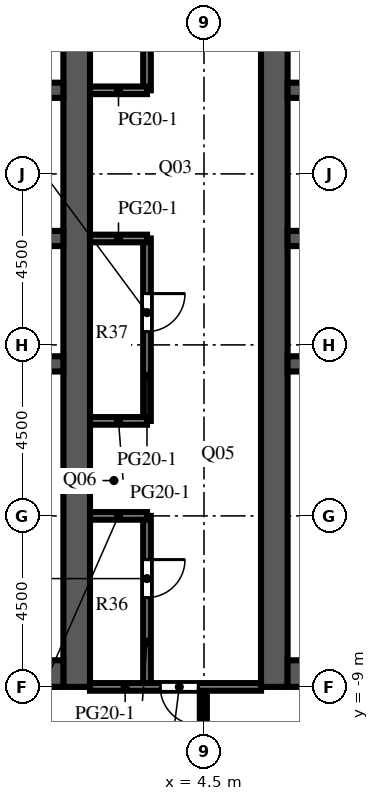
"""IFC4 building model, lengths in metres.
Left out: names, types, materials, properties, quantities, classifications, styles, units other than length and angle.
Written with IfcOpenShell. Run it as: python <this file> out.ifc"""

import sys

from ifc_helpers import new_model, si_unit, direction, frame, frame_2d, origin, place, context, subcontext, project, spatial, rectangle, extrude, element, fill, save


model = new_model("IFC4")
c1 = context("Model", 3, precision=1e-05, world=origin(), true_north=direction((0.0, 1.0)))
c2 = subcontext(c1, "Body", "Model", "MODEL_VIEW")
j1 = project(units=[si_unit("LENGTHUNIT", "METRE"), si_unit("PLANEANGLEUNIT", "RADIAN")], contexts=[c1])
p1 = place(None, origin())
s1 = spatial("IfcSite", under=j1, at=p1, CompositionType="ELEMENT")
p2 = place(p1, origin())
s2 = spatial("IfcBuilding", under=s1, at=p2, CompositionType="ELEMENT")
p3 = place(p2, frame((0.0, 0.0, 231.6)))
s3 = spatial("IfcBuildingStorey", under=s2, at=p3, CompositionType="ELEMENT", Elevation=231.6)
p4 = place(p3, frame((1.15, -9.0, 0.0), z_axis=(0.0, 0.0, 1.0), x_axis=(0.0, 1.0, 0.0)))
e1 = element("IfcWall", 1, at=p4, inside=s3, PredefinedType="SHEAR", context=c2, shape_type="SweptSolid", body=[
    extrude(rectangle(XDim=27.5, YDim=0.7, at=frame_2d((13.75, 0.0))), origin(), (0.0, 0.0, 1.0), 4.1),
])
p5 = place(p4, frame((12.55, 0.0, 0.0)))
e2 = element("IfcOpeningElement", 2, at=p5, cuts=e1, PredefinedType="OPENING", context=c2, shape_type="SweptSolid", body=[
    extrude(rectangle(XDim=2.4, YDim=2.4, at=frame_2d((1.2, 1.2))), frame((0.0, 0.36, 0.0), z_axis=(0.0, -1.0, 0.0), x_axis=(1.0, 0.0, 0.0)), (0.0, 0.0, 1.0), 0.72),
])
p6 = place(p4, frame((5.42, 0.0, 0.0)))
e3 = element("IfcOpeningElement", 3, at=p6, cuts=e1, PredefinedType="OPENING", context=c2, shape_type="SweptSolid", body=[
    extrude(rectangle(XDim=1.2, YDim=2.1, at=frame_2d((0.6, 1.05))), frame((0.0, 0.36, 0.0), z_axis=(0.0, -1.0, 0.0), x_axis=(1.0, 0.0, 0.0)), (0.0, 0.0, 1.0), 0.72),
])
p7 = place(p4, frame((19.46, 0.0, 0.0)))
e4 = element("IfcOpeningElement", 4, at=p7, cuts=e1, PredefinedType="OPENING", context=c2, shape_type="SweptSolid", body=[
    extrude(rectangle(XDim=1.0, YDim=2.1, at=frame_2d((0.5, 1.05))), frame((0.0, 0.36, 0.0), z_axis=(0.0, -1.0, 0.0), x_axis=(1.0, 0.0, 0.0)), (0.0, 0.0, 1.0), 0.72),
])
p8 = place(p4, frame((21.17, 0.0, 0.0)))
e5 = element("IfcOpeningElement", 5, at=p8, cuts=e1, PredefinedType="OPENING", context=c2, shape_type="SweptSolid", body=[
    extrude(rectangle(XDim=1.0, YDim=2.1, at=frame_2d((0.5, 1.05))), frame((0.0, 0.36, 0.0), z_axis=(0.0, -1.0, 0.0), x_axis=(1.0, 0.0, 0.0)), (0.0, 0.0, 1.0), 0.72),
])
p9 = place(p4, frame((23.26, 0.0, 0.0)))
e6 = element("IfcOpeningElement", 6, at=p9, cuts=e1, PredefinedType="OPENING", context=c2, shape_type="SweptSolid", body=[
    extrude(rectangle(XDim=1.0, YDim=2.1, at=frame_2d((0.5, 1.05))), frame((0.0, 0.36, 0.0), z_axis=(0.0, -1.0, 0.0), x_axis=(1.0, 0.0, 0.0)), (0.0, 0.0, 1.0), 0.72),
])
p10 = place(p4, frame((25.35, 0.0, 0.0)))
e7 = element("IfcOpeningElement", 7, at=p10, cuts=e1, PredefinedType="OPENING", context=c2, shape_type="SweptSolid", body=[
    extrude(rectangle(XDim=1.0, YDim=2.1, at=frame_2d((0.5, 1.05))), frame((0.0, 0.36, 0.0), z_axis=(0.0, -1.0, 0.0), x_axis=(1.0, 0.0, 0.0)), (0.0, 0.0, 1.0), 0.72),
])
p11 = place(p3, frame((-9.8, -8.65, 0.0), z_axis=(0.0, 0.0, 1.0), x_axis=(1.0, 0.0, 0.0)))
e8 = element("IfcWall", 8, at=p11, inside=s3, PredefinedType="SHEAR", context=c2, shape_type="SweptSolid", body=[
    extrude(rectangle(XDim=10.6, YDim=0.7, at=frame_2d((5.3, 0.0))), origin(), (0.0, 0.0, 1.0), 4.1),
])
p12 = place(p3, frame((-9.8, -0.5, 0.0), z_axis=(0.0, 0.0, 1.0), x_axis=(1.0, 0.0, 0.0)))
e9 = element("IfcWall", 9, at=p12, inside=s3, PredefinedType="SHEAR", context=c2, shape_type="SweptSolid", body=[
    extrude(rectangle(XDim=10.6, YDim=0.4, at=frame_2d((5.3, 0.0))), origin(), (0.0, 0.0, 1.0), 4.1),
])
p13 = place(p3, frame((-9.8, 2.8, 0.0), z_axis=(0.0, 0.0, 1.0), x_axis=(1.0, 0.0, 0.0)))
e10 = element("IfcWall", 10, at=p13, inside=s3, PredefinedType="SHEAR", context=c2, shape_type="SweptSolid", body=[
    extrude(rectangle(XDim=10.6, YDim=0.4, at=frame_2d((5.3, 0.0))), origin(), (0.0, 0.0, 1.0), 4.1),
])
p14 = place(p13, frame((0.688, 0.0, 0.0)))
e11 = element("IfcOpeningElement", 11, at=p14, cuts=e10, PredefinedType="OPENING", context=c2, shape_type="SweptSolid", body=[
    extrude(rectangle(XDim=1.1, YDim=2.1, at=frame_2d((0.55, 1.05))), frame((0.0, 0.21, 0.0), z_axis=(0.0, -1.0, 0.0), x_axis=(1.0, 0.0, 0.0)), (0.0, 0.0, 1.0), 0.42),
])
p15 = place(p13, frame((3.438, 0.0, 0.0)))
e12 = element("IfcOpeningElement", 12, at=p15, cuts=e10, PredefinedType="OPENING", context=c2, shape_type="SweptSolid", body=[
    extrude(rectangle(XDim=1.1, YDim=2.1, at=frame_2d((0.55, 1.05))), frame((0.0, 0.21, 0.0), z_axis=(0.0, -1.0, 0.0), x_axis=(1.0, 0.0, 0.0)), (0.0, 0.0, 1.0), 0.42),
])
p16 = place(p13, frame((6.113, 0.0, 0.0)))
e13 = element("IfcOpeningElement", 13, at=p16, cuts=e10, PredefinedType="OPENING", context=c2, shape_type="SweptSolid", body=[
    extrude(rectangle(XDim=1.0, YDim=2.1, at=frame_2d((0.5, 1.05))), frame((0.0, 0.21, 0.0), z_axis=(0.0, -1.0, 0.0), x_axis=(1.0, 0.0, 0.0)), (0.0, 0.0, 1.0), 0.42),
])
p17 = place(p13, frame((8.863, 0.0, 0.0)))
e14 = element("IfcOpeningElement", 14, at=p17, cuts=e10, PredefinedType="OPENING", context=c2, shape_type="SweptSolid", body=[
    extrude(rectangle(XDim=1.0, YDim=2.1, at=frame_2d((0.5, 1.05))), frame((0.0, 0.21, 0.0), z_axis=(0.0, -1.0, 0.0), x_axis=(1.0, 0.0, 0.0)), (0.0, 0.0, 1.0), 0.42),
])
p18 = place(p3, frame((-9.8, 6.7, 0.0), z_axis=(0.0, 0.0, 1.0), x_axis=(1.0, 0.0, 0.0)))
e15 = element("IfcWall", 15, at=p18, inside=s3, PredefinedType="SHEAR", context=c2, shape_type="SweptSolid", body=[
    extrude(rectangle(XDim=10.6, YDim=0.4, at=frame_2d((5.3, 0.0))), origin(), (0.0, 0.0, 1.0), 4.1),
])
p19 = place(p18, frame((3.438, 0.0, 0.0)))
e16 = element("IfcOpeningElement", 16, at=p19, cuts=e15, PredefinedType="OPENING", context=c2, shape_type="SweptSolid", body=[
    extrude(rectangle(XDim=1.1, YDim=2.1, at=frame_2d((0.55, 1.05))), frame((0.0, 0.21, 0.0), z_axis=(0.0, -1.0, 0.0), x_axis=(1.0, 0.0, 0.0)), (0.0, 0.0, 1.0), 0.42),
])
p20 = place(p18, frame((6.062, 0.0, 0.0)))
e17 = element("IfcOpeningElement", 17, at=p20, cuts=e15, PredefinedType="OPENING", context=c2, shape_type="SweptSolid", body=[
    extrude(rectangle(XDim=1.1, YDim=2.1, at=frame_2d((0.55, 1.05))), frame((0.0, 0.21, 0.0), z_axis=(0.0, -1.0, 0.0), x_axis=(1.0, 0.0, 0.0)), (0.0, 0.0, 1.0), 0.42),
])
p21 = place(p18, frame((8.812, 0.0, 0.0)))
e18 = element("IfcOpeningElement", 18, at=p21, cuts=e15, PredefinedType="OPENING", context=c2, shape_type="SweptSolid", body=[
    extrude(rectangle(XDim=1.1, YDim=2.1, at=frame_2d((0.55, 1.05))), frame((0.0, 0.21, 0.0), z_axis=(0.0, -1.0, 0.0), x_axis=(1.0, 0.0, 0.0)), (0.0, 0.0, 1.0), 0.42),
])
p22 = place(p18, frame((0.738, 0.0, 0.0)))
e19 = element("IfcOpeningElement", 19, at=p22, cuts=e15, PredefinedType="OPENING", context=c2, shape_type="SweptSolid", body=[
    extrude(rectangle(XDim=1.0, YDim=2.1, at=frame_2d((0.5, 1.05))), frame((0.0, 0.21, 0.0), z_axis=(0.0, -1.0, 0.0), x_axis=(1.0, 0.0, 0.0)), (0.0, 0.0, 1.0), 0.42),
])
p23 = place(p3, frame((6.35, -9.0, 0.0), z_axis=(0.0, 0.0, 1.0), x_axis=(0.0, 1.0, 0.0)))
e20 = element("IfcWall", 20, at=p23, inside=s3, PredefinedType="SHEAR", context=c2, shape_type="SweptSolid", body=[
    extrude(rectangle(XDim=27.5, YDim=0.7, at=frame_2d((13.75, 0.0))), origin(), (0.0, 0.0, 1.0), 4.1),
])
p24 = place(p23, frame((12.55, 0.0, 0.0)))
e21 = element("IfcOpeningElement", 21, at=p24, cuts=e20, PredefinedType="OPENING", context=c2, shape_type="SweptSolid", body=[
    extrude(rectangle(XDim=2.4, YDim=2.4, at=frame_2d((1.2, 1.2))), frame((0.0, 0.36, 0.0), z_axis=(0.0, -1.0, 0.0), x_axis=(1.0, 0.0, 0.0)), (0.0, 0.0, 1.0), 0.72),
])
p25 = place(p23, frame((5.42, 0.0, 0.0)))
e22 = element("IfcOpeningElement", 22, at=p25, cuts=e20, PredefinedType="OPENING", context=c2, shape_type="SweptSolid", body=[
    extrude(rectangle(XDim=1.2, YDim=2.1, at=frame_2d((0.6, 1.05))), frame((0.0, 0.36, 0.0), z_axis=(0.0, -1.0, 0.0), x_axis=(1.0, 0.0, 0.0)), (0.0, 0.0, 1.0), 0.72),
])
p26 = place(p23, frame((19.46, 0.0, 0.0)))
e23 = element("IfcOpeningElement", 23, at=p26, cuts=e20, PredefinedType="OPENING", context=c2, shape_type="SweptSolid", body=[
    extrude(rectangle(XDim=1.0, YDim=2.1, at=frame_2d((0.5, 1.05))), frame((0.0, 0.36, 0.0), z_axis=(0.0, -1.0, 0.0), x_axis=(1.0, 0.0, 0.0)), (0.0, 0.0, 1.0), 0.72),
])
p27 = place(p23, frame((21.17, 0.0, 0.0)))
e24 = element("IfcOpeningElement", 24, at=p27, cuts=e20, PredefinedType="OPENING", context=c2, shape_type="SweptSolid", body=[
    extrude(rectangle(XDim=1.0, YDim=2.1, at=frame_2d((0.5, 1.05))), frame((0.0, 0.36, 0.0), z_axis=(0.0, -1.0, 0.0), x_axis=(1.0, 0.0, 0.0)), (0.0, 0.0, 1.0), 0.72),
])
p28 = place(p23, frame((23.26, 0.0, 0.0)))
e25 = element("IfcOpeningElement", 25, at=p28, cuts=e20, PredefinedType="OPENING", context=c2, shape_type="SweptSolid", body=[
    extrude(rectangle(XDim=1.0, YDim=2.1, at=frame_2d((0.5, 1.05))), frame((0.0, 0.36, 0.0), z_axis=(0.0, -1.0, 0.0), x_axis=(1.0, 0.0, 0.0)), (0.0, 0.0, 1.0), 0.72),
])
p29 = place(p23, frame((25.35, 0.0, 0.0)))
e26 = element("IfcOpeningElement", 26, at=p29, cuts=e20, PredefinedType="OPENING", context=c2, shape_type="SweptSolid", body=[
    extrude(rectangle(XDim=1.0, YDim=2.1, at=frame_2d((0.5, 1.05))), frame((0.0, 0.36, 0.0), z_axis=(0.0, -1.0, 0.0), x_axis=(1.0, 0.0, 0.0)), (0.0, 0.0, 1.0), 0.72),
])
p30 = place(p3, frame((6.7, -8.65, 0.0), z_axis=(0.0, 0.0, 1.0), x_axis=(1.0, 0.0, 0.0)))
e27 = element("IfcWall", 27, at=p30, inside=s3, PredefinedType="SHEAR", context=c2, shape_type="SweptSolid", body=[
    extrude(rectangle(XDim=10.6, YDim=0.7, at=frame_2d((5.3, 0.0))), origin(), (0.0, 0.0, 1.0), 4.1),
])
p31 = place(p3, frame((6.7, -0.5, 0.0), z_axis=(0.0, 0.0, 1.0), x_axis=(1.0, 0.0, 0.0)))
e28 = element("IfcWall", 28, at=p31, inside=s3, PredefinedType="SHEAR", context=c2, shape_type="SweptSolid", body=[
    extrude(rectangle(XDim=10.6, YDim=0.4, at=frame_2d((5.3, 0.0))), origin(), (0.0, 0.0, 1.0), 4.1),
])
p32 = place(p3, frame((6.7, 2.8, 0.0), z_axis=(0.0, 0.0, 1.0), x_axis=(1.0, 0.0, 0.0)))
e29 = element("IfcWall", 29, at=p32, inside=s3, PredefinedType="SHEAR", context=c2, shape_type="SweptSolid", body=[
    extrude(rectangle(XDim=10.6, YDim=0.4, at=frame_2d((5.3, 0.0))), origin(), (0.0, 0.0, 1.0), 4.1),
])
p33 = place(p32, frame((0.688, 0.0, 0.0)))
e30 = element("IfcOpeningElement", 30, at=p33, cuts=e29, PredefinedType="OPENING", context=c2, shape_type="SweptSolid", body=[
    extrude(rectangle(XDim=1.1, YDim=2.1, at=frame_2d((0.55, 1.05))), frame((0.0, 0.21, 0.0), z_axis=(0.0, -1.0, 0.0), x_axis=(1.0, 0.0, 0.0)), (0.0, 0.0, 1.0), 0.42),
])
p34 = place(p32, frame((3.438, 0.0, 0.0)))
e31 = element("IfcOpeningElement", 31, at=p34, cuts=e29, PredefinedType="OPENING", context=c2, shape_type="SweptSolid", body=[
    extrude(rectangle(XDim=1.1, YDim=2.1, at=frame_2d((0.55, 1.05))), frame((0.0, 0.21, 0.0), z_axis=(0.0, -1.0, 0.0), x_axis=(1.0, 0.0, 0.0)), (0.0, 0.0, 1.0), 0.42),
])
p35 = place(p32, frame((6.113, 0.0, 0.0)))
e32 = element("IfcOpeningElement", 32, at=p35, cuts=e29, PredefinedType="OPENING", context=c2, shape_type="SweptSolid", body=[
    extrude(rectangle(XDim=1.0, YDim=2.1, at=frame_2d((0.5, 1.05))), frame((0.0, 0.21, 0.0), z_axis=(0.0, -1.0, 0.0), x_axis=(1.0, 0.0, 0.0)), (0.0, 0.0, 1.0), 0.42),
])
p36 = place(p32, frame((8.863, 0.0, 0.0)))
e33 = element("IfcOpeningElement", 33, at=p36, cuts=e29, PredefinedType="OPENING", context=c2, shape_type="SweptSolid", body=[
    extrude(rectangle(XDim=1.0, YDim=2.1, at=frame_2d((0.5, 1.05))), frame((0.0, 0.21, 0.0), z_axis=(0.0, -1.0, 0.0), x_axis=(1.0, 0.0, 0.0)), (0.0, 0.0, 1.0), 0.42),
])
p37 = place(p3, frame((6.7, 6.7, 0.0), z_axis=(0.0, 0.0, 1.0), x_axis=(1.0, 0.0, 0.0)))
e34 = element("IfcWall", 34, at=p37, inside=s3, PredefinedType="SHEAR", context=c2, shape_type="SweptSolid", body=[
    extrude(rectangle(XDim=10.6, YDim=0.4, at=frame_2d((5.3, 0.0))), origin(), (0.0, 0.0, 1.0), 4.1),
])
p38 = place(p37, frame((3.438, 0.0, 0.0)))
e35 = element("IfcOpeningElement", 35, at=p38, cuts=e34, PredefinedType="OPENING", context=c2, shape_type="SweptSolid", body=[
    extrude(rectangle(XDim=1.1, YDim=2.1, at=frame_2d((0.55, 1.05))), frame((0.0, 0.21, 0.0), z_axis=(0.0, -1.0, 0.0), x_axis=(1.0, 0.0, 0.0)), (0.0, 0.0, 1.0), 0.42),
])
p39 = place(p37, frame((6.062, 0.0, 0.0)))
e36 = element("IfcOpeningElement", 36, at=p39, cuts=e34, PredefinedType="OPENING", context=c2, shape_type="SweptSolid", body=[
    extrude(rectangle(XDim=1.1, YDim=2.1, at=frame_2d((0.55, 1.05))), frame((0.0, 0.21, 0.0), z_axis=(0.0, -1.0, 0.0), x_axis=(1.0, 0.0, 0.0)), (0.0, 0.0, 1.0), 0.42),
])
p40 = place(p37, frame((8.812, 0.0, 0.0)))
e37 = element("IfcOpeningElement", 37, at=p40, cuts=e34, PredefinedType="OPENING", context=c2, shape_type="SweptSolid", body=[
    extrude(rectangle(XDim=1.1, YDim=2.1, at=frame_2d((0.55, 1.05))), frame((0.0, 0.21, 0.0), z_axis=(0.0, -1.0, 0.0), x_axis=(1.0, 0.0, 0.0)), (0.0, 0.0, 1.0), 0.42),
])
p41 = place(p37, frame((0.738, 0.0, 0.0)))
e38 = element("IfcOpeningElement", 38, at=p41, cuts=e34, PredefinedType="OPENING", context=c2, shape_type="SweptSolid", body=[
    extrude(rectangle(XDim=1.0, YDim=2.1, at=frame_2d((0.5, 1.05))), frame((0.0, 0.21, 0.0), z_axis=(0.0, -1.0, 0.0), x_axis=(1.0, 0.0, 0.0)), (0.0, 0.0, 1.0), 0.42),
])
p42 = place(p3, frame((-0.7, -5.26, 0.0), z_axis=(0.0, 0.0, 1.0), x_axis=(1.0, 0.0, 0.0)))
e39 = element("IfcWall", 39, at=p42, inside=s3, PredefinedType="PARTITIONING", context=c2, shape_type="SweptSolid", body=[
    extrude(rectangle(XDim=1.5, YDim=0.1, at=frame_2d((0.75, 0.0))), origin(), (0.0, 0.0, 1.0), 3.65),
])
p43 = place(p42, frame((0.25, 0.0, 0.0)))
e40 = element("IfcOpeningElement", 40, at=p43, cuts=e39, PredefinedType="OPENING", context=c2, shape_type="SweptSolid", body=[
    extrude(rectangle(XDim=1.0, YDim=2.1, at=frame_2d((0.5, 1.05))), frame((0.0, 0.06, 0.0), z_axis=(0.0, -1.0, 0.0), x_axis=(1.0, 0.0, 0.0)), (0.0, 0.0, 1.0), 0.12),
])
p44 = place(p3, frame((6.7, -5.26, 0.0), z_axis=(0.0, 0.0, 1.0), x_axis=(1.0, 0.0, 0.0)))
e41 = element("IfcWall", 41, at=p44, inside=s3, PredefinedType="PARTITIONING", context=c2, shape_type="SweptSolid", body=[
    extrude(rectangle(XDim=1.5, YDim=0.1, at=frame_2d((0.75, 0.0))), origin(), (0.0, 0.0, 1.0), 3.65),
])
p45 = place(p44, frame((0.25, 0.0, 0.0)))
e42 = element("IfcOpeningElement", 42, at=p45, cuts=e41, PredefinedType="OPENING", context=c2, shape_type="SweptSolid", body=[
    extrude(rectangle(XDim=1.0, YDim=2.1, at=frame_2d((0.5, 1.05))), frame((0.0, 0.06, 0.0), z_axis=(0.0, -1.0, 0.0), x_axis=(1.0, 0.0, 0.0)), (0.0, 0.0, 1.0), 0.12),
])
p46 = place(p3, frame((3.0, -9.0, 0.0), z_axis=(0.0, 0.0, 1.0), x_axis=(0.0, 1.0, 0.0)))
e43 = element("IfcWall", 43, at=p46, inside=s3, PredefinedType="PARTITIONING", context=c2, shape_type="SweptSolid", body=[
    extrude(rectangle(XDim=4.5, YDim=0.2, at=frame_2d((2.25, 0.0))), origin(), (0.0, 0.0, 1.0), 3.65),
])
p47 = place(p46, frame((2.35, 0.0, 0.0)))
e44 = element("IfcOpeningElement", 44, at=p47, cuts=e43, PredefinedType="OPENING", context=c2, shape_type="SweptSolid", body=[
    extrude(rectangle(XDim=1.0, YDim=2.1, at=frame_2d((0.5, 1.05))), frame((0.0, 0.11, 0.0), z_axis=(0.0, -1.0, 0.0), x_axis=(1.0, 0.0, 0.0)), (0.0, 0.0, 1.0), 0.22),
])
p48 = place(p3, frame((3.0, -2.0, 0.0), z_axis=(0.0, 0.0, 1.0), x_axis=(0.0, 1.0, 0.0)))
e45 = element("IfcWall", 45, at=p48, inside=s3, PredefinedType="PARTITIONING", context=c2, shape_type="SweptSolid", body=[
    extrude(rectangle(XDim=4.8, YDim=0.2, at=frame_2d((2.4, 0.0))), origin(), (0.0, 0.0, 1.0), 3.65),
])
p49 = place(p48, frame((2.35, 0.0, 0.0)))
e46 = element("IfcOpeningElement", 46, at=p49, cuts=e45, PredefinedType="OPENING", context=c2, shape_type="SweptSolid", body=[
    extrude(rectangle(XDim=1.0, YDim=2.1, at=frame_2d((0.5, 1.05))), frame((0.0, 0.11, 0.0), z_axis=(0.0, -1.0, 0.0), x_axis=(1.0, 0.0, 0.0)), (0.0, 0.0, 1.0), 0.22),
])
p50 = place(p3, frame((3.0, 6.7, 0.0), z_axis=(0.0, 0.0, 1.0), x_axis=(0.0, 1.0, 0.0)))
e47 = element("IfcWall", 47, at=p50, inside=s3, PredefinedType="PARTITIONING", context=c2, shape_type="SweptSolid", body=[
    extrude(rectangle(XDim=11.8, YDim=0.2, at=frame_2d((5.9, 0.0))), origin(), (0.0, 0.0, 1.0), 3.65),
])
p51 = place(p50, frame((3.6, 0.0, 0.0)))
e48 = element("IfcOpeningElement", 48, at=p51, cuts=e47, PredefinedType="OPENING", context=c2, shape_type="SweptSolid", body=[
    extrude(rectangle(XDim=1.0, YDim=2.1, at=frame_2d((0.5, 1.05))), frame((0.0, 0.11, 0.0), z_axis=(0.0, -1.0, 0.0), x_axis=(1.0, 0.0, 0.0)), (0.0, 0.0, 1.0), 0.22),
])
p52 = place(p3, frame((4.5, -9.0, 0.0), z_axis=(0.0, 0.0, 1.0), x_axis=(0.0, -1.0, 0.0)))
e49 = element("IfcWall", 49, at=p52, inside=s3, PredefinedType="PARTITIONING", context=c2, shape_type="SweptSolid", body=[
    extrude(rectangle(XDim=13.1, YDim=0.15, at=frame_2d((6.55, 0.0))), origin(), (0.0, 0.0, 1.0), 3.65),
])
p53 = place(p52, frame((9.15, 0.0, 0.0)))
e50 = element("IfcOpeningElement", 50, at=p53, cuts=e49, PredefinedType="OPENING", context=c2, shape_type="SweptSolid", body=[
    extrude(rectangle(XDim=1.0, YDim=2.1, at=frame_2d((0.5, 1.05))), frame((0.0, 0.085, 0.0), z_axis=(0.0, -1.0, 0.0), x_axis=(1.0, 0.0, 0.0)), (0.0, 0.0, 1.0), 0.17),
])
p54 = place(p3, frame((6.0, -9.0, 0.0), z_axis=(0.0, 0.0, 1.0), x_axis=(-1.0, 0.0, 0.0)))
e51 = element("IfcWall", 51, at=p54, inside=s3, PredefinedType="PARTITIONING", context=c2, shape_type="SweptSolid", body=[
    extrude(rectangle(XDim=4.5, YDim=0.2, at=frame_2d((2.25, 0.0))), origin(), (0.0, 0.0, 1.0), 3.65),
])
p55 = place(p54, frame((1.65, 0.0, 0.0)))
e52 = element("IfcOpeningElement", 52, at=p55, cuts=e51, PredefinedType="OPENING", context=c2, shape_type="SweptSolid", body=[
    extrude(rectangle(XDim=1.0, YDim=2.1, at=frame_2d((0.5, 1.05))), frame((0.0, 0.11, 0.0), z_axis=(0.0, -1.0, 0.0), x_axis=(1.0, 0.0, 0.0)), (0.0, 0.0, 1.0), 0.22),
])
for number, where, z_axis, x_axis in (
    (53, (1.5, -4.5, 0.0), (0.0, 0.0, 1.0), (1.0, 0.0, 0.0)),
    (54, (1.5, -2.0, 0.0), (0.0, 0.0, 1.0), (1.0, 0.0, 0.0)),
    (55, (1.5, 2.8, 0.0), (0.0, 0.0, 1.0), (1.0, 0.0, 0.0)),
    (56, (1.5, 6.7, 0.0), (0.0, 0.0, 1.0), (1.0, 0.0, 0.0)),
):
    element("IfcWall", number, at=place(p3, frame(where, z_axis=z_axis, x_axis=x_axis)), inside=s3, PredefinedType="PARTITIONING", context=c2, shape_type="SweptSolid", body=[
        extrude(rectangle(XDim=1.5, YDim=0.2, at=frame_2d((0.75, 0.0))), origin(), (0.0, 0.0, 1.0), 3.65),
    ])
p56 = place(p5, origin())
e57 = element("IfcDoor", 57, at=p56, inside=s3, OperationType="DOUBLE_DOOR_DOUBLE_SWING", PredefinedType="DOOR", context=c2, shape_type="SweptSolid", body=[
    extrude(rectangle(XDim=2.4, YDim=2.4, at=frame_2d((1.2, 1.2))), frame((0.0, 0.025, 0.0), z_axis=(0.0, -1.0, 0.0), x_axis=(1.0, 0.0, 0.0)), (0.0, 0.0, 1.0), 0.05),
])
fill(e2, e57)
p57 = place(p24, origin())
e58 = element("IfcDoor", 58, at=p57, inside=s3, OperationType="DOUBLE_DOOR_DOUBLE_SWING", PredefinedType="DOOR", context=c2, shape_type="SweptSolid", body=[
    extrude(rectangle(XDim=2.4, YDim=2.4, at=frame_2d((1.2, 1.2))), frame((0.0, 0.025, 0.0), z_axis=(0.0, -1.0, 0.0), x_axis=(1.0, 0.0, 0.0)), (0.0, 0.0, 1.0), 0.05),
])
fill(e21, e58)
p58 = place(p6, origin())
e59 = element("IfcDoor", 59, at=p58, inside=s3, OperationType="SINGLE_SWING_LEFT", PredefinedType="DOOR", context=c2, shape_type="SweptSolid", body=[
    extrude(rectangle(XDim=1.2, YDim=2.1, at=frame_2d((0.6, 1.05))), frame((0.0, 0.325, 0.0), z_axis=(0.0, -1.0, 0.0), x_axis=(1.0, 0.0, 0.0)), (0.0, 0.0, 1.0), 0.05),
])
fill(e3, e59)
p59 = place(p43, origin())
e60 = element("IfcDoor", 60, at=p59, inside=s3, OperationType="SINGLE_SWING_RIGHT", PredefinedType="DOOR", context=c2, shape_type="SweptSolid", body=[
    extrude(rectangle(XDim=1.0, YDim=2.1, at=frame_2d((0.5, 1.05))), frame((0.0, 0.025, 0.0), z_axis=(0.0, -1.0, 0.0), x_axis=(1.0, 0.0, 0.0)), (0.0, 0.0, 1.0), 0.05),
])
fill(e40, e60)
p60 = place(p25, origin())
e61 = element("IfcDoor", 61, at=p60, inside=s3, OperationType="SINGLE_SWING_RIGHT", PredefinedType="DOOR", context=c2, shape_type="SweptSolid", body=[
    extrude(rectangle(XDim=1.2, YDim=2.1, at=frame_2d((0.6, 1.05))), frame((0.0, -0.275, 0.0), z_axis=(0.0, -1.0, 0.0), x_axis=(1.0, 0.0, 0.0)), (0.0, 0.0, 1.0), 0.05),
])
fill(e22, e61)
p61 = place(p45, origin())
e62 = element("IfcDoor", 62, at=p61, inside=s3, OperationType="SINGLE_SWING_LEFT", PredefinedType="DOOR", context=c2, shape_type="SweptSolid", body=[
    extrude(rectangle(XDim=1.0, YDim=2.1, at=frame_2d((0.5, 1.05))), frame((0.0, 0.025, 0.0), z_axis=(0.0, -1.0, 0.0), x_axis=(1.0, 0.0, 0.0)), (0.0, 0.0, 1.0), 0.05),
])
fill(e42, e62)
p62 = place(p55, origin())
e63 = element("IfcDoor", 63, at=p62, inside=s3, OperationType="SINGLE_SWING_LEFT", PredefinedType="DOOR", context=c2, shape_type="SweptSolid", body=[
    extrude(rectangle(XDim=1.0, YDim=2.1, at=frame_2d((0.5, 1.05))), frame((0.0, 0.025, 0.0), z_axis=(0.0, -1.0, 0.0), x_axis=(1.0, 0.0, 0.0)), (0.0, 0.0, 1.0), 0.05),
])
fill(e52, e63)
p63 = place(p47, origin())
e64 = element("IfcDoor", 64, at=p63, inside=s3, OperationType="SINGLE_SWING_RIGHT", PredefinedType="DOOR", context=c2, shape_type="SweptSolid", body=[
    extrude(rectangle(XDim=1.0, YDim=2.1, at=frame_2d((0.5, 1.05))), frame((0.0, 0.025, 0.0), z_axis=(0.0, -1.0, 0.0), x_axis=(1.0, 0.0, 0.0)), (0.0, 0.0, 1.0), 0.05),
])
fill(e44, e64)
p64 = place(p49, origin())
e65 = element("IfcDoor", 65, at=p64, inside=s3, OperationType="SINGLE_SWING_RIGHT", PredefinedType="DOOR", context=c2, shape_type="SweptSolid", body=[
    extrude(rectangle(XDim=1.0, YDim=2.1, at=frame_2d((0.5, 1.05))), frame((0.0, 0.025, 0.0), z_axis=(0.0, -1.0, 0.0), x_axis=(1.0, 0.0, 0.0)), (0.0, 0.0, 1.0), 0.05),
])
fill(e46, e65)
save(model, sys.argv[1])
